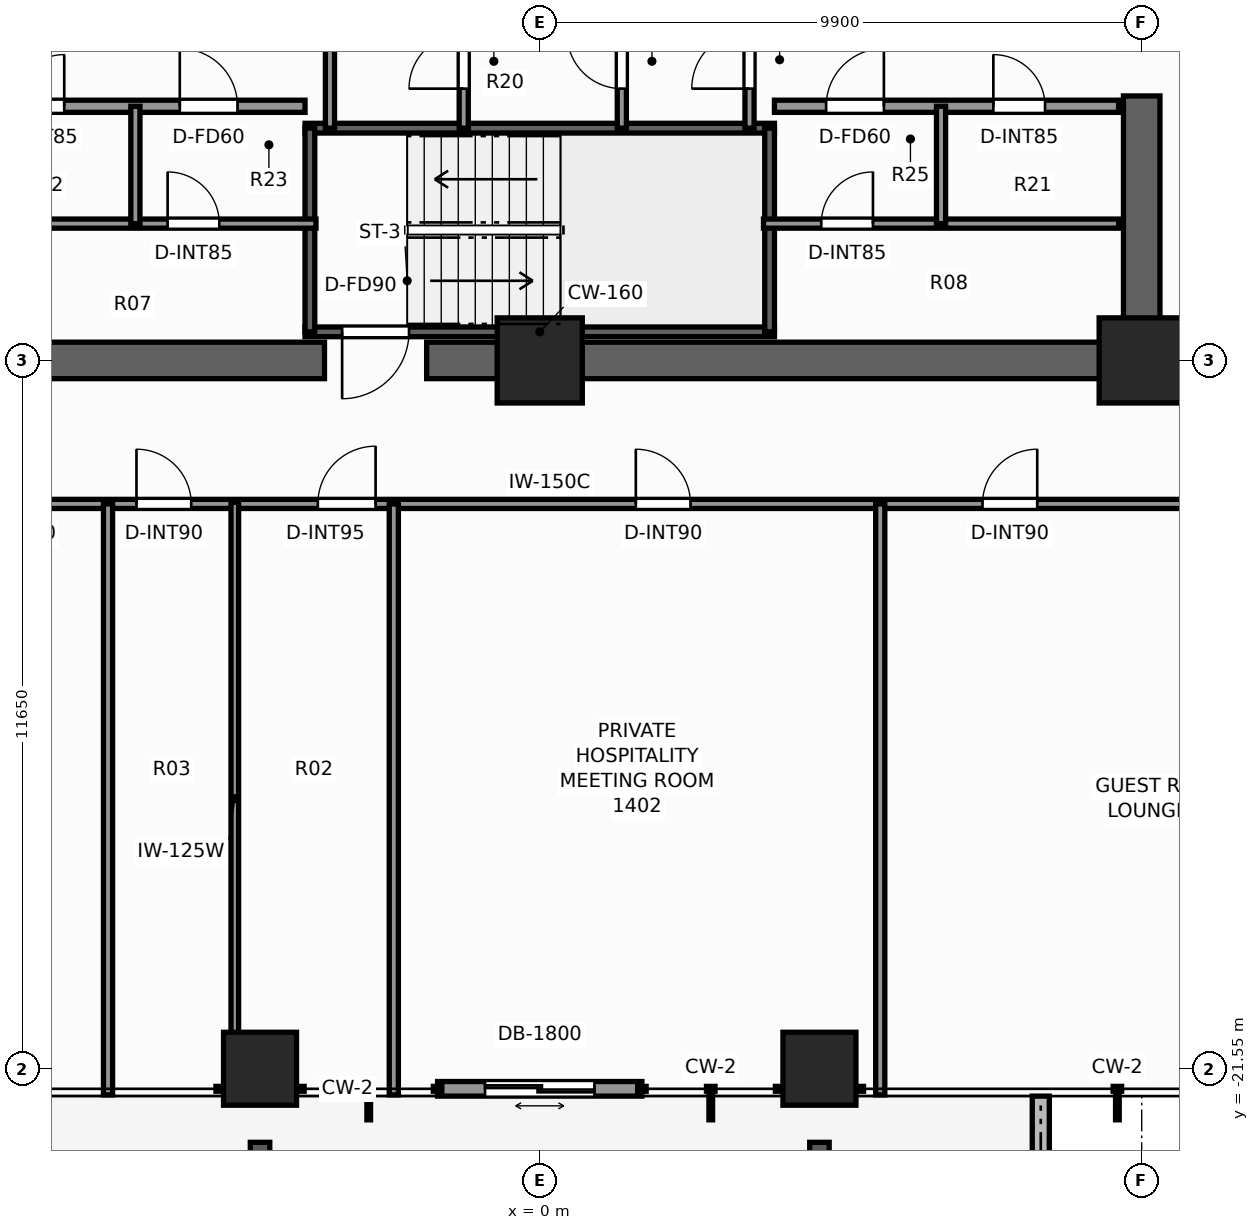
"""IFC4 building model, lengths in metres.
Left out: names, types, materials, properties, quantities, classifications, styles, units other than length and angle.
Written with IfcOpenShell. Run it as: python <this file> out.ifc"""

import sys

from ifc_helpers import new_model, si_unit, direction, frame, frame_2d, origin, origin_2d, place, context, subcontext, project, spatial, rectangle, extrude, element, fill, save


model = new_model("IFC4")
c1 = context("Model", 3, precision=1e-05, world=origin(), true_north=direction((0.0, 1.0)))
c2 = subcontext(c1, "Body", "Model", "MODEL_VIEW")
j1 = project(units=[si_unit("LENGTHUNIT", "METRE"), si_unit("PLANEANGLEUNIT", "RADIAN")], contexts=[c1])
p1 = place(None, origin())
s1 = spatial("IfcSite", under=j1, at=p1, CompositionType="ELEMENT")
p2 = place(p1, origin())
s2 = spatial("IfcBuilding", under=s1, at=p2, CompositionType="ELEMENT")
p3 = place(p2, frame((0.0, 0.0, 50.2)))
s3 = spatial("IfcBuildingStorey", under=s2, at=p3, CompositionType="ELEMENT", Elevation=50.2)
p4 = place(p3, frame((10.2, -9.9, 0.0), z_axis=(0.0, 0.0, 1.0), x_axis=(-1.0, 0.0, 0.0)))
e1 = element("IfcWall", 1, at=p4, inside=s3, PredefinedType="SHEAR", context=c2, shape_type="SweptSolid", body=[
    extrude(rectangle(XDim=12.06, YDim=0.6, at=frame_2d((6.03, 0.0))), origin(), (0.0, 0.0, 1.0), 3.3),
])
p5 = place(p3, frame((-3.54, -9.9, 0.0), z_axis=(0.0, 0.0, 1.0), x_axis=(-1.0, 0.0, 0.0)))
e2 = element("IfcWall", 2, at=p5, inside=s3, PredefinedType="SHEAR", context=c2, shape_type="SweptSolid", body=[
    extrude(rectangle(XDim=6.66, YDim=0.6, at=frame_2d((3.33, 0.0))), origin(), (0.0, 0.0, 1.0), 3.3),
])
p6 = place(p3, frame((9.9, -9.6, 0.0), z_axis=(0.0, 0.0, 1.0), x_axis=(0.0, 1.0, 0.0)))
e3 = element("IfcWall", 3, at=p6, inside=s3, PredefinedType="SHEAR", context=c2, shape_type="SweptSolid", body=[
    extrude(rectangle(XDim=4.05, YDim=0.6, at=frame_2d((2.025, 0.0))), origin(), (0.0, 0.0, 1.0), 3.3),
])
for number, where, z_axis, x_axis in (
    (4, (9.9, -9.9, 0.0), (0.0, 0.0, 1.0), (1.0, 0.0, 0.0)),
    (5, (0.0, -9.9, 0.0), (0.0, 0.0, 1.0), (1.0, 0.0, 0.0)),
):
    element("IfcColumn", number, at=place(p3, frame(where, z_axis=z_axis, x_axis=x_axis)), inside=s3, PredefinedType="COLUMN", context=c2, shape_type="SweptSolid", body=[
        extrude(rectangle(XDim=1.4, YDim=1.4, at=origin_2d()), origin(), (0.0, 0.0, 1.0), 3.3),
    ])
for number, where, z_axis, x_axis in (
    (6, (-4.6, -21.55, 0.0), (0.0, 0.0, 1.0), (1.0, 0.0, 0.0)),
    (7, (4.6, -21.55, 0.0), (0.0, 0.0, 1.0), (1.0, 0.0, 0.0)),
):
    element("IfcColumn", number, at=place(p3, frame(where, z_axis=z_axis, x_axis=x_axis)), inside=s3, PredefinedType="COLUMN", context=c2, shape_type="SweptSolid", body=[
        extrude(rectangle(XDim=1.2, YDim=1.2, at=origin_2d()), origin(), (0.0, 0.0, 1.0), 3.3),
    ])
p7 = place(p3, frame((8.24, -23.466, -0.06), z_axis=(0.0, 0.0, 1.0), x_axis=(0.0, 1.0, 0.0)))
e8 = element("IfcWall", 8, at=p7, inside=s3, PredefinedType="PARAPET", context=c2, shape_type="SweptSolid", body=[
    extrude(rectangle(XDim=1.466, YDim=0.28, at=frame_2d((0.733, 0.0))), origin(), (0.0, 0.0, 1.0), 0.42),
])
p8 = place(p3, frame((1.68, -21.88, 0.0), z_axis=(0.0, 0.0, 1.0), x_axis=(-1.0, 0.0, 0.0)))
e9 = element("IfcWall", 9, at=p8, inside=s3, PredefinedType="STANDARD", context=c2, shape_type="SweptSolid", body=[
    extrude(rectangle(XDim=3.36, YDim=0.24, at=frame_2d((1.68, 0.0))), origin(), (0.0, 0.0, 1.0), 3.06),
])
p9 = place(p8, frame((0.78, 0.0, 0.0)))
e10 = element("IfcOpeningElement", 10, at=p9, cuts=e9, PredefinedType="OPENING", context=c2, shape_type="SweptSolid", body=[
    extrude(rectangle(XDim=1.8, YDim=2.2, at=frame_2d((0.9, 1.1))), frame((0.0, 0.13, 0.0), z_axis=(0.0, -1.0, 0.0), x_axis=(1.0, 0.0, 0.0)), (0.0, 0.0, 1.0), 0.26),
])
p10 = place(p3, frame((3.86, -9.43, 0.0), z_axis=(0.0, 0.0, 1.0), x_axis=(-1.0, 0.0, 0.0)))
e11 = element("IfcWall", 11, at=p10, inside=s3, PredefinedType="SHEAR", context=c2, shape_type="SweptSolid", body=[
    extrude(rectangle(XDim=7.72, YDim=0.16, at=frame_2d((3.86, 0.0))), origin(), (0.0, 0.0, 1.0), 3.3),
])
p11 = place(p10, frame((6.01, 0.0, 0.0)))
e12 = element("IfcOpeningElement", 12, at=p11, cuts=e11, PredefinedType="OPENING", context=c2, shape_type="SweptSolid", body=[
    extrude(rectangle(XDim=1.1, YDim=2.2, at=frame_2d((0.55, 1.1))), frame((0.0, 0.09, 0.0), z_axis=(0.0, -1.0, 0.0), x_axis=(1.0, 0.0, 0.0)), (0.0, 0.0, 1.0), 0.18),
])
p12 = place(p3, frame((-3.86, -6.08, 0.0), z_axis=(0.0, 0.0, 1.0), x_axis=(1.0, 0.0, 0.0)))
e13 = element("IfcWall", 13, at=p12, inside=s3, PredefinedType="SHEAR", context=c2, shape_type="SweptSolid", body=[
    extrude(rectangle(XDim=7.72, YDim=0.16, at=frame_2d((3.86, 0.0))), origin(), (0.0, 0.0, 1.0), 3.3),
])
for number, where, z_axis, x_axis in (
    (14, (-3.78, -9.43, 0.0), (0.0, 0.0, 1.0), (0.0, 1.0, 0.0)),
    (15, (3.78, -9.43, 0.0), (0.0, 0.0, 1.0), (0.0, 1.0, 0.0)),
):
    element("IfcWall", number, at=place(p3, frame(where, z_axis=z_axis, x_axis=x_axis)), inside=s3, PredefinedType="SHEAR", context=c2, shape_type="SweptSolid", body=[
        extrude(rectangle(XDim=3.35, YDim=0.16, at=frame_2d((1.675, 0.0))), origin(), (0.0, 0.0, 1.0), 3.3),
    ])
p13 = place(p3, frame((-9.52, -5.72, 0.0), z_axis=(0.0, 0.0, 1.0), x_axis=(1.0, 0.0, 0.0)))
e16 = element("IfcWall", 16, at=p13, inside=s3, PredefinedType="SOLIDWALL", context=c2, shape_type="SweptSolid", body=[
    extrude(rectangle(XDim=5.66, YDim=0.2, at=frame_2d((2.83, 0.0))), origin(), (0.0, 0.0, 1.0), 3.06),
])
p14 = place(p13, frame((3.6, 0.0, 0.0)))
e17 = element("IfcOpeningElement", 17, at=p14, cuts=e16, PredefinedType="OPENING", context=c2, shape_type="SweptSolid", body=[
    extrude(rectangle(XDim=0.95, YDim=2.06, at=frame_2d((0.475, 1.03))), frame((0.0, 0.11, 0.0), z_axis=(0.0, -1.0, 0.0), x_axis=(1.0, 0.0, 0.0)), (0.0, 0.0, 1.0), 0.22),
])
p15 = place(p13, frame((0.85, 0.0, 0.0)))
e18 = element("IfcOpeningElement", 18, at=p15, cuts=e16, PredefinedType="OPENING", context=c2, shape_type="SweptSolid", body=[
    extrude(rectangle(XDim=0.85, YDim=2.03, at=frame_2d((0.425, 1.015))), frame((0.0, 0.11, 0.0), z_axis=(0.0, -1.0, 0.0), x_axis=(1.0, 0.0, 0.0)), (0.0, 0.0, 1.0), 0.22),
])
p16 = place(p3, frame((-9.52, -7.65, 0.0), z_axis=(0.0, 0.0, 1.0), x_axis=(1.0, 0.0, 0.0)))
e19 = element("IfcWall", 19, at=p16, inside=s3, PredefinedType="PARTITIONING", context=c2, shape_type="SweptSolid", body=[
    extrude(rectangle(XDim=5.84, YDim=0.15, at=frame_2d((2.92, 0.0))), origin(), (0.0, 0.0, 1.0), 3.06),
])
p17 = place(p16, frame((3.4, 0.0, 0.0)))
e20 = element("IfcOpeningElement", 20, at=p17, cuts=e19, PredefinedType="OPENING", context=c2, shape_type="SweptSolid", body=[
    extrude(rectangle(XDim=0.85, YDim=2.03, at=frame_2d((0.425, 1.015))), frame((0.0, 0.085, 0.0), z_axis=(0.0, -1.0, 0.0), x_axis=(1.0, 0.0, 0.0)), (0.0, 0.0, 1.0), 0.17),
])
p18 = place(p3, frame((-6.65, -7.65, 0.0), z_axis=(0.0, 0.0, 1.0), x_axis=(0.0, 1.0, 0.0)))
e21 = element("IfcWall", 21, at=p18, inside=s3, PredefinedType="PARTITIONING", context=c2, shape_type="SweptSolid", body=[
    extrude(rectangle(XDim=1.93, YDim=0.15, at=frame_2d((0.965, 0.0))), origin(), (0.0, 0.0, 1.0), 3.06),
])
p19 = place(p3, frame((3.86, -5.72, 0.0), z_axis=(0.0, 0.0, 1.0), x_axis=(1.0, 0.0, 0.0)))
e22 = element("IfcWall", 22, at=p19, inside=s3, PredefinedType="SOLIDWALL", context=c2, shape_type="SweptSolid", body=[
    extrude(rectangle(XDim=5.66, YDim=0.2, at=frame_2d((2.83, 0.0))), origin(), (0.0, 0.0, 1.0), 3.06),
])
p20 = place(p19, frame((0.85, 0.0, 0.0)))
e23 = element("IfcOpeningElement", 23, at=p20, cuts=e22, PredefinedType="OPENING", context=c2, shape_type="SweptSolid", body=[
    extrude(rectangle(XDim=0.95, YDim=2.06, at=frame_2d((0.475, 1.03))), frame((0.0, 0.11, 0.0), z_axis=(0.0, -1.0, 0.0), x_axis=(1.0, 0.0, 0.0)), (0.0, 0.0, 1.0), 0.22),
])
p21 = place(p19, frame((3.6, 0.0, 0.0)))
e24 = element("IfcOpeningElement", 24, at=p21, cuts=e22, PredefinedType="OPENING", context=c2, shape_type="SweptSolid", body=[
    extrude(rectangle(XDim=0.85, YDim=2.03, at=frame_2d((0.425, 1.015))), frame((0.0, 0.11, 0.0), z_axis=(0.0, -1.0, 0.0), x_axis=(1.0, 0.0, 0.0)), (0.0, 0.0, 1.0), 0.22),
])
p22 = place(p3, frame((3.68, -7.65, 0.0), z_axis=(0.0, 0.0, 1.0), x_axis=(1.0, 0.0, 0.0)))
e25 = element("IfcWall", 25, at=p22, inside=s3, PredefinedType="PARTITIONING", context=c2, shape_type="SweptSolid", body=[
    extrude(rectangle(XDim=5.84, YDim=0.15, at=frame_2d((2.92, 0.0))), origin(), (0.0, 0.0, 1.0), 3.06),
])
p23 = place(p22, frame((0.95, 0.0, 0.0)))
e26 = element("IfcOpeningElement", 26, at=p23, cuts=e25, PredefinedType="OPENING", context=c2, shape_type="SweptSolid", body=[
    extrude(rectangle(XDim=0.85, YDim=2.03, at=frame_2d((0.425, 1.015))), frame((0.0, 0.085, 0.0), z_axis=(0.0, -1.0, 0.0), x_axis=(1.0, 0.0, 0.0)), (0.0, 0.0, 1.0), 0.17),
])
p24 = place(p3, frame((6.6, -7.65, 0.0), z_axis=(0.0, 0.0, 1.0), x_axis=(0.0, 1.0, 0.0)))
e27 = element("IfcWall", 27, at=p24, inside=s3, PredefinedType="PARTITIONING", context=c2, shape_type="SweptSolid", body=[
    extrude(rectangle(XDim=1.93, YDim=0.15, at=frame_2d((0.965, 0.0))), origin(), (0.0, 0.0, 1.0), 3.06),
])
p25 = place(p3, frame((3.45, -6.08, 0.0), z_axis=(0.0, 0.0, 1.0), x_axis=(0.0, 1.0, 0.0)))
e28 = element("IfcWall", 28, at=p25, inside=s3, PredefinedType="PARTITIONING", context=c2, shape_type="SweptSolid", body=[
    extrude(rectangle(XDim=2.36, YDim=0.15, at=frame_2d((1.18, 0.0))), origin(), (0.0, 0.0, 1.0), 3.06),
])
p26 = place(p25, frame((0.65, 0.0, 0.0)))
e29 = element("IfcOpeningElement", 29, at=p26, cuts=e28, PredefinedType="OPENING", context=c2, shape_type="SweptSolid", body=[
    extrude(rectangle(XDim=0.95, YDim=2.06, at=frame_2d((0.475, 1.03))), frame((0.0, 0.085, 0.0), z_axis=(0.0, -1.0, 0.0), x_axis=(1.0, 0.0, 0.0)), (0.0, 0.0, 1.0), 0.17),
])
p27 = place(p3, frame((-3.45, -6.08, 0.0), z_axis=(0.0, 0.0, 1.0), x_axis=(0.0, 1.0, 0.0)))
e30 = element("IfcWall", 30, at=p27, inside=s3, PredefinedType="PARTITIONING", context=c2, shape_type="SweptSolid", body=[
    extrude(rectangle(XDim=2.36, YDim=0.15, at=frame_2d((1.18, 0.0))), origin(), (0.0, 0.0, 1.0), 3.06),
])
p28 = place(p3, frame((1.35, -6.08, 0.0), z_axis=(0.0, 0.0, 1.0), x_axis=(0.0, 1.0, 0.0)))
e31 = element("IfcWall", 31, at=p28, inside=s3, PredefinedType="PARTITIONING", context=c2, shape_type="SweptSolid", body=[
    extrude(rectangle(XDim=2.36, YDim=0.15, at=frame_2d((1.18, 0.0))), origin(), (0.0, 0.0, 1.0), 3.06),
])
p29 = place(p28, frame((0.65, 0.0, 0.0)))
e32 = element("IfcOpeningElement", 32, at=p29, cuts=e31, PredefinedType="OPENING", context=c2, shape_type="SweptSolid", body=[
    extrude(rectangle(XDim=0.9, YDim=2.06, at=frame_2d((0.45, 1.03))), frame((0.0, 0.085, 0.0), z_axis=(0.0, -1.0, 0.0), x_axis=(1.0, 0.0, 0.0)), (0.0, 0.0, 1.0), 0.17),
])
p30 = place(p3, frame((-1.25, -6.08, 0.0), z_axis=(0.0, 0.0, 1.0), x_axis=(0.0, 1.0, 0.0)))
e33 = element("IfcWall", 33, at=p30, inside=s3, PredefinedType="PARTITIONING", context=c2, shape_type="SweptSolid", body=[
    extrude(rectangle(XDim=2.36, YDim=0.15, at=frame_2d((1.18, 0.0))), origin(), (0.0, 0.0, 1.0), 3.06),
])
p31 = place(p30, frame((0.65, 0.0, 0.0)))
e34 = element("IfcOpeningElement", 34, at=p31, cuts=e33, PredefinedType="OPENING", context=c2, shape_type="SweptSolid", body=[
    extrude(rectangle(XDim=0.9, YDim=2.06, at=frame_2d((0.45, 1.03))), frame((0.0, 0.085, 0.0), z_axis=(0.0, -1.0, 0.0), x_axis=(1.0, 0.0, 0.0)), (0.0, 0.0, 1.0), 0.17),
])
p32 = place(p3, frame((-12.26, -12.26, 0.0), z_axis=(0.0, 0.0, 1.0), x_axis=(1.0, 0.0, 0.0)))
e35 = element("IfcWall", 35, at=p32, inside=s3, PredefinedType="PARTITIONING", context=c2, shape_type="SweptSolid", body=[
    extrude(rectangle(XDim=24.84, YDim=0.15, at=frame_2d((12.42, 0.0))), origin(), (0.0, 0.0, 1.0), 2.272),
])
p33 = place(p32, frame((3.203, 0.0, 0.0)))
e36 = element("IfcOpeningElement", 36, at=p33, cuts=e35, PredefinedType="OPENING", context=c2, shape_type="SweptSolid", body=[
    extrude(rectangle(XDim=0.9, YDim=2.06, at=frame_2d((0.45, 1.03))), frame((0.0, 0.085, 0.0), z_axis=(0.0, -1.0, 0.0), x_axis=(1.0, 0.0, 0.0)), (0.0, 0.0, 1.0), 0.17),
])
p34 = place(p32, frame((5.628, 0.0, 0.0)))
e37 = element("IfcOpeningElement", 37, at=p34, cuts=e35, PredefinedType="OPENING", context=c2, shape_type="SweptSolid", body=[
    extrude(rectangle(XDim=0.9, YDim=2.06, at=frame_2d((0.45, 1.03))), frame((0.0, 0.085, 0.0), z_axis=(0.0, -1.0, 0.0), x_axis=(1.0, 0.0, 0.0)), (0.0, 0.0, 1.0), 0.17),
])
p35 = place(p32, frame((8.611, 0.0, 0.0)))
e38 = element("IfcOpeningElement", 38, at=p35, cuts=e35, PredefinedType="OPENING", context=c2, shape_type="SweptSolid", body=[
    extrude(rectangle(XDim=0.95, YDim=2.06, at=frame_2d((0.475, 1.03))), frame((0.0, 0.085, 0.0), z_axis=(0.0, -1.0, 0.0), x_axis=(1.0, 0.0, 0.0)), (0.0, 0.0, 1.0), 0.17),
])
p36 = place(p32, frame((13.84, 0.0, 0.0)))
e39 = element("IfcOpeningElement", 39, at=p36, cuts=e35, PredefinedType="OPENING", context=c2, shape_type="SweptSolid", body=[
    extrude(rectangle(XDim=0.9, YDim=2.06, at=frame_2d((0.45, 1.03))), frame((0.0, 0.085, 0.0), z_axis=(0.0, -1.0, 0.0), x_axis=(1.0, 0.0, 0.0)), (0.0, 0.0, 1.0), 0.17),
])
p37 = place(p32, frame((19.542, 0.0, 0.0)))
e40 = element("IfcOpeningElement", 40, at=p37, cuts=e35, PredefinedType="OPENING", context=c2, shape_type="SweptSolid", body=[
    extrude(rectangle(XDim=0.9, YDim=2.06, at=frame_2d((0.45, 1.03))), frame((0.0, 0.085, 0.0), z_axis=(0.0, -1.0, 0.0), x_axis=(1.0, 0.0, 0.0)), (0.0, 0.0, 1.0), 0.17),
])
for number, where, z_axis, x_axis in (
    (41, (-7.1, -21.98, 0.0), (0.0, 0.0, 1.0), (0.0, 1.0, 0.0)),
    (42, (-2.4, -21.98, 0.0), (0.0, 0.0, 1.0), (0.0, 1.0, 0.0)),
):
    element("IfcWall", number, at=place(p3, frame(where, z_axis=z_axis, x_axis=x_axis)), inside=s3, PredefinedType="PARTITIONING", context=c2, shape_type="SweptSolid", body=[
        extrude(rectangle(XDim=9.72, YDim=0.15, at=frame_2d((4.86, 0.0))), origin(), (0.0, 0.0, 1.0), 2.429),
    ])
p38 = place(p3, frame((-5.015, -21.98, 0.0), z_axis=(0.0, 0.0, 1.0), x_axis=(0.0, 1.0, 0.0)))
e43 = element("IfcWall", 43, at=p38, inside=s3, PredefinedType="PARTITIONING", context=c2, shape_type="SweptSolid", body=[
    extrude(rectangle(XDim=9.745, YDim=0.125, at=frame_2d((4.873, 0.0))), origin(), (0.0, 0.0, 1.0), 2.429),
])
p39 = place(p3, frame((5.6, -21.98, 0.0), z_axis=(0.0, 0.0, 1.0), x_axis=(0.0, 1.0, 0.0)))
e44 = element("IfcWall", 44, at=p39, inside=s3, PredefinedType="PARTITIONING", context=c2, shape_type="SweptSolid", body=[
    extrude(rectangle(XDim=9.72, YDim=0.15, at=frame_2d((4.86, 0.0))), origin(), (0.0, 0.0, 1.0), 2.429),
])
p40 = place(p9, origin())
e45 = element("IfcDoor", 45, at=p40, inside=s3, OperationType="DOUBLE_DOOR_SLIDING", PredefinedType="DOOR", context=c2, shape_type="SweptSolid", body=[
    extrude(rectangle(XDim=1.8, YDim=2.2, at=frame_2d((0.9, 1.1))), frame((0.0, 0.025, 0.0), z_axis=(0.0, -1.0, 0.0), x_axis=(1.0, 0.0, 0.0)), (0.0, 0.0, 1.0), 0.05),
])
fill(e10, e45)
p41 = place(p11, origin())
e46 = element("IfcDoor", 46, at=p41, inside=s3, OperationType="SINGLE_SWING_RIGHT", PredefinedType="DOOR", context=c2, shape_type="SweptSolid", body=[
    extrude(rectangle(XDim=1.1, YDim=2.2, at=frame_2d((0.55, 1.1))), frame((0.0, 0.025, 0.0), z_axis=(0.0, -1.0, 0.0), x_axis=(1.0, 0.0, 0.0)), (0.0, 0.0, 1.0), 0.05),
])
fill(e12, e46)
p42 = place(p14, origin())
e47 = element("IfcDoor", 47, at=p42, inside=s3, OperationType="SINGLE_SWING_LEFT", PredefinedType="DOOR", context=c2, shape_type="SweptSolid", body=[
    extrude(rectangle(XDim=0.95, YDim=2.06, at=frame_2d((0.475, 1.03))), frame((0.0, 0.025, 0.0), z_axis=(0.0, -1.0, 0.0), x_axis=(1.0, 0.0, 0.0)), (0.0, 0.0, 1.0), 0.05),
])
fill(e17, e47)
p43 = place(p15, origin())
e48 = element("IfcDoor", 48, at=p43, inside=s3, OperationType="SINGLE_SWING_RIGHT", PredefinedType="DOOR", context=c2, shape_type="SweptSolid", body=[
    extrude(rectangle(XDim=0.85, YDim=2.03, at=frame_2d((0.425, 1.015))), frame((0.0, 0.025, 0.0), z_axis=(0.0, -1.0, 0.0), x_axis=(1.0, 0.0, 0.0)), (0.0, 0.0, 1.0), 0.05),
])
fill(e18, e48)
p44 = place(p17, origin())
e49 = element("IfcDoor", 49, at=p44, inside=s3, OperationType="SINGLE_SWING_LEFT", PredefinedType="DOOR", context=c2, shape_type="SweptSolid", body=[
    extrude(rectangle(XDim=0.85, YDim=2.03, at=frame_2d((0.425, 1.015))), frame((0.0, 0.025, 0.0), z_axis=(0.0, -1.0, 0.0), x_axis=(1.0, 0.0, 0.0)), (0.0, 0.0, 1.0), 0.05),
])
fill(e20, e49)
p45 = place(p20, origin())
e50 = element("IfcDoor", 50, at=p45, inside=s3, OperationType="SINGLE_SWING_RIGHT", PredefinedType="DOOR", context=c2, shape_type="SweptSolid", body=[
    extrude(rectangle(XDim=0.95, YDim=2.06, at=frame_2d((0.475, 1.03))), frame((0.0, 0.025, 0.0), z_axis=(0.0, -1.0, 0.0), x_axis=(1.0, 0.0, 0.0)), (0.0, 0.0, 1.0), 0.05),
])
fill(e23, e50)
p46 = place(p21, origin())
e51 = element("IfcDoor", 51, at=p46, inside=s3, OperationType="SINGLE_SWING_LEFT", PredefinedType="DOOR", context=c2, shape_type="SweptSolid", body=[
    extrude(rectangle(XDim=0.85, YDim=2.03, at=frame_2d((0.425, 1.015))), frame((0.0, 0.025, 0.0), z_axis=(0.0, -1.0, 0.0), x_axis=(1.0, 0.0, 0.0)), (0.0, 0.0, 1.0), 0.05),
])
fill(e24, e51)
p47 = place(p23, origin())
e52 = element("IfcDoor", 52, at=p47, inside=s3, OperationType="SINGLE_SWING_RIGHT", PredefinedType="DOOR", context=c2, shape_type="SweptSolid", body=[
    extrude(rectangle(XDim=0.85, YDim=2.03, at=frame_2d((0.425, 1.015))), frame((0.0, 0.025, 0.0), z_axis=(0.0, -1.0, 0.0), x_axis=(1.0, 0.0, 0.0)), (0.0, 0.0, 1.0), 0.05),
])
fill(e26, e52)
p48 = place(p26, origin())
e53 = element("IfcDoor", 53, at=p48, inside=s3, OperationType="SINGLE_SWING_LEFT", PredefinedType="DOOR", context=c2, shape_type="SweptSolid", body=[
    extrude(rectangle(XDim=0.95, YDim=2.06, at=frame_2d((0.475, 1.03))), frame((0.0, 0.025, 0.0), z_axis=(0.0, -1.0, 0.0), x_axis=(1.0, 0.0, 0.0)), (0.0, 0.0, 1.0), 0.05),
])
fill(e29, e53)
p49 = place(p29, origin())
e54 = element("IfcDoor", 54, at=p49, inside=s3, OperationType="SINGLE_SWING_RIGHT", PredefinedType="DOOR", context=c2, shape_type="SweptSolid", body=[
    extrude(rectangle(XDim=0.9, YDim=2.06, at=frame_2d((0.45, 1.03))), frame((0.0, 0.025, 0.0), z_axis=(0.0, -1.0, 0.0), x_axis=(1.0, 0.0, 0.0)), (0.0, 0.0, 1.0), 0.05),
])
fill(e32, e54)
p50 = place(p31, origin())
e55 = element("IfcDoor", 55, at=p50, inside=s3, OperationType="SINGLE_SWING_LEFT", PredefinedType="DOOR", context=c2, shape_type="SweptSolid", body=[
    extrude(rectangle(XDim=0.9, YDim=2.06, at=frame_2d((0.45, 1.03))), frame((0.0, 0.025, 0.0), z_axis=(0.0, -1.0, 0.0), x_axis=(1.0, 0.0, 0.0)), (0.0, 0.0, 1.0), 0.05),
])
fill(e34, e55)
p51 = place(p34, origin())
e56 = element("IfcDoor", 56, at=p51, inside=s3, OperationType="SINGLE_SWING_LEFT", PredefinedType="DOOR", context=c2, shape_type="SweptSolid", body=[
    extrude(rectangle(XDim=0.9, YDim=2.06, at=frame_2d((0.45, 1.03))), frame((0.0, 0.025, 0.0), z_axis=(0.0, -1.0, 0.0), x_axis=(1.0, 0.0, 0.0)), (0.0, 0.0, 1.0), 0.05),
])
fill(e37, e56)
p52 = place(p35, origin())
e57 = element("IfcDoor", 57, at=p52, inside=s3, OperationType="SINGLE_SWING_RIGHT", PredefinedType="DOOR", context=c2, shape_type="SweptSolid", body=[
    extrude(rectangle(XDim=0.95, YDim=2.06, at=frame_2d((0.475, 1.03))), frame((0.0, 0.025, 0.0), z_axis=(0.0, -1.0, 0.0), x_axis=(1.0, 0.0, 0.0)), (0.0, 0.0, 1.0), 0.05),
])
fill(e38, e57)
p53 = place(p36, origin())
e58 = element("IfcDoor", 58, at=p53, inside=s3, OperationType="SINGLE_SWING_LEFT", PredefinedType="DOOR", context=c2, shape_type="SweptSolid", body=[
    extrude(rectangle(XDim=0.9, YDim=2.06, at=frame_2d((0.45, 1.03))), frame((0.0, 0.025, 0.0), z_axis=(0.0, -1.0, 0.0), x_axis=(1.0, 0.0, 0.0)), (0.0, 0.0, 1.0), 0.05),
])
fill(e39, e58)
p54 = place(p37, origin())
e59 = element("IfcDoor", 59, at=p54, inside=s3, OperationType="SINGLE_SWING_RIGHT", PredefinedType="DOOR", context=c2, shape_type="SweptSolid", body=[
    extrude(rectangle(XDim=0.9, YDim=2.06, at=frame_2d((0.45, 1.03))), frame((0.0, 0.025, 0.0), z_axis=(0.0, -1.0, 0.0), x_axis=(1.0, 0.0, 0.0)), (0.0, 0.0, 1.0), 0.05),
])
fill(e40, e59)
save(model, sys.argv[1])
